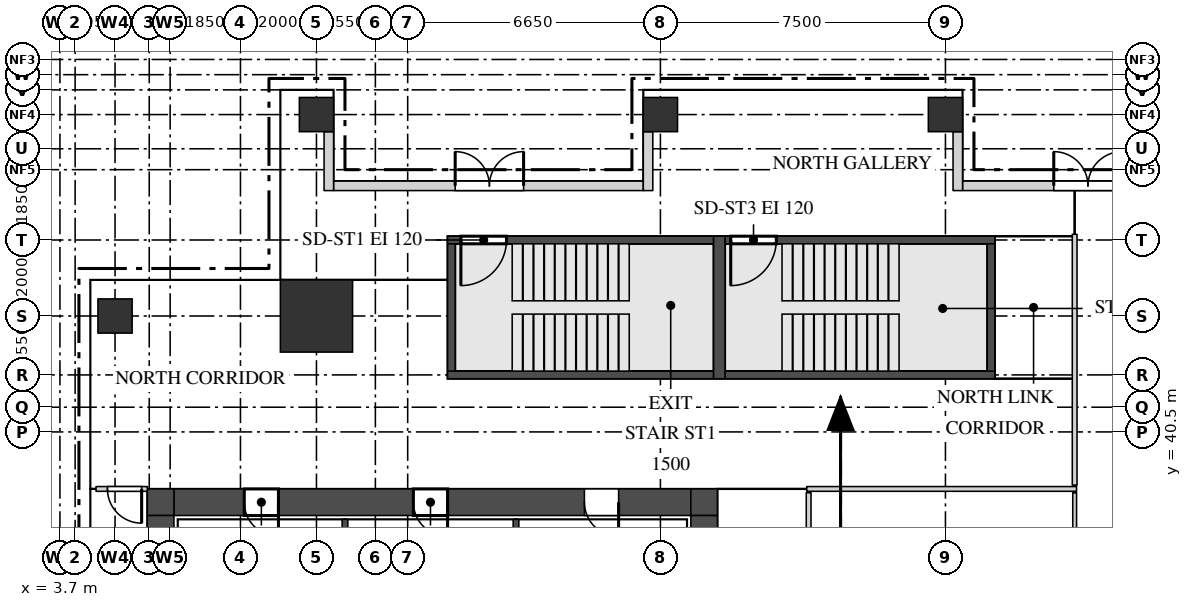
"""IFC4 building model, lengths in metres.
Left out: names, types, materials, properties, quantities, classifications, styles, units other than length and angle.
Written with IfcOpenShell. Run it as: python <this file> out.ifc"""

import sys

from ifc_helpers import new_model, si_unit, direction, frame, frame_2d, origin, origin_2d, place, context, subcontext, project, spatial, rectangle, extrude, source, transform, mapped, element, fill, save


model = new_model("IFC4")
c1 = context("Model", 3, precision=1e-05, world=origin(), true_north=direction((0.0, 1.0)))
c2 = subcontext(c1, "Body", "Model", "MODEL_VIEW")
j1 = project(units=[si_unit("LENGTHUNIT", "METRE"), si_unit("PLANEANGLEUNIT", "RADIAN")], contexts=[c1])
p1 = place(None, origin())
s1 = spatial("IfcSite", under=j1, at=p1, CompositionType="ELEMENT")
p2 = place(p1, origin())
s2 = spatial("IfcBuilding", under=s1, at=p2, CompositionType="ELEMENT")
p3 = place(p2, frame((0.0, 0.0, 234.2)))
s3 = spatial("IfcBuildingStorey", under=s2, at=p3, CompositionType="ELEMENT", Elevation=234.2)
m1 = source(origin(), c2, "Body", "SweptSolid", [
    extrude(rectangle(XDim=13.6, YDim=0.7, at=frame_2d((6.8, 0.0))), origin(), (0.0, 0.0, 1.0), 3.75),
])
p4 = place(p3, frame((6.7, 38.65, 0.0), z_axis=(0.0, 0.0, 1.0), x_axis=(1.0, 0.0, 0.0)))
e1 = element("IfcWall", 1, at=p4, inside=s3, PredefinedType="SHEAR", context=c2, shape_type="MappedRepresentation", body=[
    mapped(m1, transform((0.0, 0.0, 0.0))),
])
m2 = source(origin(), c2, "Body", "SweptSolid", [
    extrude(rectangle(XDim=0.9, YDim=2.1, at=frame_2d((0.45, 1.05))), frame((0.0, 0.36, 0.0), z_axis=(0.0, -1.0, 0.0), x_axis=(1.0, 0.0, 0.0)), (0.0, 0.0, 1.0), 0.72),
])
p5 = place(p4, frame((1.85, 0.0, 0.0)))
e2 = element("IfcOpeningElement", 2, at=p5, cuts=e1, PredefinedType="OPENING", context=c2, shape_type="MappedRepresentation", body=[
    mapped(m2, transform((0.0, 0.0, 0.0))),
])
p6 = place(p4, frame((6.3, 0.0, 0.0)))
e3 = element("IfcOpeningElement", 3, at=p6, cuts=e1, PredefinedType="OPENING", context=c2, shape_type="MappedRepresentation", body=[
    mapped(m2, transform((0.0, 0.0, 0.0))),
])
p7 = place(p4, frame((10.8, 0.0, 0.0)))
e4 = element("IfcOpeningElement", 4, at=p7, cuts=e1, PredefinedType="OPENING", context=c2, shape_type="MappedRepresentation", body=[
    mapped(m2, transform((0.0, 0.0, 0.0))),
])
m3 = source(origin(), c2, "Body", "SweptSolid", [
    extrude(rectangle(XDim=0.7, YDim=0.7, at=frame_2d((0.35, 0.0))), origin(), (0.0, 0.0, 1.0), 3.75),
])
for number, where, z_axis, x_axis in (
    (5, (20.3, 38.65, 0.0), (0.0, 0.0, 1.0), (1.0, 0.0, 0.0)),
    (6, (6.0, 38.65, 0.0), (0.0, 0.0, 1.0), (1.0, 0.0, 0.0)),
):
    element("IfcWall", number, at=place(p3, frame(where, z_axis=z_axis, x_axis=x_axis)), inside=s3, PredefinedType="SHEAR", context=c2, shape_type="MappedRepresentation", body=[
        mapped(m3, transform((0.0, 0.0, 0.0))),
    ])
m4 = source(origin(), c2, "Body", "SweptSolid", [
    extrude(rectangle(XDim=22.6, YDim=0.7, at=frame_2d((11.3, 0.0))), origin(), (0.0, 0.0, 1.0), 3.75),
])
p8 = place(p3, frame((20.65, 15.7, 0.0), z_axis=(0.0, 0.0, 1.0), x_axis=(0.0, 1.0, 0.0)))
e7 = element("IfcWall", 7, at=p8, inside=s3, PredefinedType="SHEAR", context=c2, shape_type="MappedRepresentation", body=[
    mapped(m4, transform((0.0, 0.0, 0.0))),
])
m5 = source(origin(), c2, "Body", "SweptSolid", [
    extrude(rectangle(XDim=1.8, YDim=2.1, at=frame_2d((0.9, 1.05))), frame((0.0, 0.36, 0.0), z_axis=(0.0, -1.0, 0.0), x_axis=(1.0, 0.0, 0.0)), (0.0, 0.0, 1.0), 0.72),
])
p9 = place(p8, frame((10.8, 0.0, 0.0)))
e8 = element("IfcOpeningElement", 8, at=p9, cuts=e7, PredefinedType="OPENING", context=c2, shape_type="MappedRepresentation", body=[
    mapped(m5, transform((0.0, 0.0, 0.0))),
])
p10 = place(p8, frame((0.45, 0.0, 0.0)))
e9 = element("IfcOpeningElement", 9, at=p10, cuts=e7, PredefinedType="OPENING", context=c2, shape_type="MappedRepresentation", body=[
    mapped(m2, transform((0.0, 0.0, 0.0))),
])
m6 = source(origin(), c2, "Body", "SweptSolid", [
    extrude(rectangle(XDim=1.0, YDim=2.1, at=frame_2d((0.5, 1.05))), frame((0.0, 0.36, 0.0), z_axis=(0.0, -1.0, 0.0), x_axis=(1.0, 0.0, 0.0)), (0.0, 0.0, 1.0), 0.72),
])
p11 = place(p8, frame((2.2, 0.0, 0.0)))
e10 = element("IfcOpeningElement", 10, at=p11, cuts=e7, PredefinedType="OPENING", context=c2, shape_type="MappedRepresentation", body=[
    mapped(m6, transform((0.0, 0.0, 0.0))),
])
p12 = place(p8, frame((5.0, 0.0, 0.0)))
e11 = element("IfcOpeningElement", 11, at=p12, cuts=e7, PredefinedType="OPENING", context=c2, shape_type="MappedRepresentation", body=[
    mapped(m2, transform((0.0, 0.0, 0.0))),
])
p13 = place(p3, frame((6.35, 15.7, 0.0), z_axis=(0.0, 0.0, 1.0), x_axis=(0.0, 1.0, 0.0)))
e12 = element("IfcWall", 12, at=p13, inside=s3, PredefinedType="SHEAR", context=c2, shape_type="MappedRepresentation", body=[
    mapped(m4, transform((0.0, 0.0, 0.0))),
])
m7 = source(origin(), c2, "Body", "SweptSolid", [
    extrude(rectangle(XDim=7.0, YDim=0.2, at=frame_2d((3.5, 0.0))), origin(), (0.0, 0.0, 1.0), 3.75),
])
p14 = place(p3, frame((13.9, 45.55, 0.0), z_axis=(0.0, 0.0, 1.0), x_axis=(1.0, 0.0, 0.0)))
e13 = element("IfcWall", 13, at=p14, inside=s3, PredefinedType="SHEAR", context=c2, shape_type="MappedRepresentation", body=[
    mapped(m7, transform((0.0, 0.0, 0.0))),
])
m8 = source(origin(), c2, "Body", "SweptSolid", [
    extrude(rectangle(XDim=1.2, YDim=2.1, at=frame_2d((0.6, 1.05))), frame((0.0, 0.11, 0.0), z_axis=(0.0, -1.0, 0.0), x_axis=(1.0, 0.0, 0.0)), (0.0, 0.0, 1.0), 0.22),
])
p15 = place(p14, frame((0.35, 0.0, 0.0)))
e14 = element("IfcOpeningElement", 14, at=p15, cuts=e13, PredefinedType="OPENING", context=c2, shape_type="MappedRepresentation", body=[
    mapped(m8, transform((0.0, 0.0, 0.0))),
])
p16 = place(p3, frame((13.9, 42.0, 0.0), z_axis=(0.0, 0.0, 1.0), x_axis=(1.0, 0.0, 0.0)))
e15 = element("IfcWall", 15, at=p16, inside=s3, PredefinedType="SHEAR", context=c2, shape_type="MappedRepresentation", body=[
    mapped(m7, transform((0.0, 0.0, 0.0))),
])
m9 = source(origin(), c2, "Body", "SweptSolid", [
    extrude(rectangle(XDim=7.1, YDim=0.2, at=frame_2d((3.55, 0.0))), origin(), (0.0, 0.0, 1.0), 3.75),
])
p17 = place(p3, frame((21.2, 45.55, 0.0), z_axis=(0.0, 0.0, 1.0), x_axis=(1.0, 0.0, 0.0)))
e16 = element("IfcWall", 16, at=p17, inside=s3, PredefinedType="SHEAR", context=c2, shape_type="MappedRepresentation", body=[
    mapped(m9, transform((0.0, 0.0, 0.0))),
])
p18 = place(p17, frame((0.15, 0.0, 0.0)))
e17 = element("IfcOpeningElement", 17, at=p18, cuts=e16, PredefinedType="OPENING", context=c2, shape_type="MappedRepresentation", body=[
    mapped(m8, transform((0.0, 0.0, 0.0))),
])
p19 = place(p3, frame((21.2, 42.0, 0.0), z_axis=(0.0, 0.0, 1.0), x_axis=(1.0, 0.0, 0.0)))
e18 = element("IfcWall", 18, at=p19, inside=s3, PredefinedType="SHEAR", context=c2, shape_type="MappedRepresentation", body=[
    mapped(m9, transform((0.0, 0.0, 0.0))),
])
m10 = source(origin(), c2, "Body", "SweptSolid", [
    extrude(rectangle(XDim=3.75, YDim=0.3, at=frame_2d((1.875, 0.0))), origin(), (0.0, 0.0, 1.0), 3.75),
])
p20 = place(p3, frame((21.05, 41.9, 0.0), z_axis=(0.0, 0.0, 1.0), x_axis=(0.0, 1.0, 0.0)))
e19 = element("IfcWall", 19, at=p20, inside=s3, PredefinedType="SHEAR", context=c2, shape_type="MappedRepresentation", body=[
    mapped(m10, transform((0.0, 0.0, 0.0))),
])
m11 = source(origin(), c2, "Body", "SweptSolid", [
    extrude(rectangle(XDim=3.35, YDim=0.2, at=frame_2d((1.675, 0.0))), origin(), (0.0, 0.0, 1.0), 3.75),
])
for number, where, z_axis, x_axis in (
    (20, (14.0, 42.1, 0.0), (0.0, 0.0, 1.0), (0.0, 1.0, 0.0)),
    (21, (28.2, 42.1, 0.0), (0.0, 0.0, 1.0), (0.0, 1.0, 0.0)),
):
    element("IfcWall", number, at=place(p3, frame(where, z_axis=z_axis, x_axis=x_axis)), inside=s3, PredefinedType="SHEAR", context=c2, shape_type="MappedRepresentation", body=[
        mapped(m11, transform((0.0, 0.0, 0.0))),
    ])
m12 = source(origin(), c2, "Body", "SweptSolid", [
    extrude(rectangle(XDim=1.9, YDim=1.9, at=origin_2d()), origin(), (0.0, 0.0, 1.0), 4.0),
])
p21 = place(p3, frame((10.45, 43.55, 0.0), z_axis=(0.0, 0.0, 1.0), x_axis=(1.0, 0.0, 0.0)))
e22 = element("IfcColumn", 22, at=p21, inside=s3, PredefinedType="COLUMN", context=c2, shape_type="MappedRepresentation", body=[
    mapped(m12, transform((0.0, 0.0, 0.0))),
])
m13 = source(origin(), c2, "Body", "SweptSolid", [
    extrude(rectangle(XDim=0.9, YDim=0.9, at=origin_2d()), origin(), (0.0, 0.0, 1.0), 3.75),
])
for number, where, z_axis, x_axis in (
    (23, (10.45, 48.85, 0.0), (0.0, 0.0, 1.0), (1.0, 0.0, 0.0)),
    (24, (19.5, 48.85, 0.0), (0.0, 0.0, 1.0), (1.0, 0.0, 0.0)),
    (25, (27.0, 48.85, 0.0), (0.0, 0.0, 1.0), (1.0, 0.0, 0.0)),
    (26, (5.15, 43.55, 0.0), (0.0, 0.0, 1.0), (1.0, 0.0, 0.0)),
):
    element("IfcColumn", number, at=place(p3, frame(where, z_axis=z_axis, x_axis=x_axis)), inside=s3, PredefinedType="COLUMN", context=c2, shape_type="MappedRepresentation", body=[
        mapped(m13, transform((0.0, 0.0, 0.0))),
    ])
m14 = source(origin(), c2, "Body", "SweptSolid", [
    extrude(rectangle(XDim=6.6, YDim=0.25, at=frame_2d((3.3, 0.0))), origin(), (0.0, 0.0, 1.0), 3.75),
])
p22 = place(p3, frame((27.45, 46.975, 0.0), z_axis=(0.0, 0.0, 1.0), x_axis=(1.0, 0.0, 0.0)))
e27 = element("IfcWall", 27, at=p22, inside=s3, PredefinedType="SOLIDWALL", context=c2, shape_type="MappedRepresentation", body=[
    mapped(m14, transform((0.0, 0.0, 0.0))),
])
m15 = source(origin(), c2, "Body", "SweptSolid", [
    extrude(rectangle(XDim=1.75, YDim=2.4, at=frame_2d((0.875, 1.2))), frame((0.0, 0.135, 0.0), z_axis=(0.0, -1.0, 0.0), x_axis=(1.0, 0.0, 0.0)), (0.0, 0.0, 1.0), 0.27),
])
p23 = place(p22, frame((0.35, 0.0, 0.0)))
e28 = element("IfcOpeningElement", 28, at=p23, cuts=e27, PredefinedType="OPENING", context=c2, shape_type="MappedRepresentation", body=[
    mapped(m15, transform((0.0, 0.0, 0.0))),
])
p24 = place(p22, frame((4.5, 0.0, 0.0)))
e29 = element("IfcOpeningElement", 29, at=p24, cuts=e27, PredefinedType="OPENING", context=c2, shape_type="MappedRepresentation", body=[
    mapped(m15, transform((0.0, 0.0, 0.0))),
])
m16 = source(origin(), c2, "Body", "SweptSolid", [
    extrude(rectangle(XDim=1.8, YDim=2.4, at=frame_2d((0.9, 1.2))), frame((0.0, 0.135, 0.0), z_axis=(0.0, -1.0, 0.0), x_axis=(1.0, 0.0, 0.0)), (0.0, 0.0, 1.0), 0.27),
])
p25 = place(p22, frame((2.4, 0.0, 0.0)))
e30 = element("IfcOpeningElement", 30, at=p25, cuts=e27, PredefinedType="OPENING", context=c2, shape_type="MappedRepresentation", body=[
    mapped(m16, transform((0.0, 0.0, 0.0))),
])
m17 = source(origin(), c2, "Body", "SweptSolid", [
    extrude(rectangle(XDim=1.55, YDim=0.25, at=frame_2d((0.775, 0.0))), origin(), (0.0, 0.0, 1.0), 3.45),
])
p26 = place(p3, frame((27.325, 48.4, 0.0), z_axis=(0.0, 0.0, 1.0), x_axis=(0.0, -1.0, 0.0)))
e31 = element("IfcWall", 31, at=p26, inside=s3, PredefinedType="SOLIDWALL", context=c2, shape_type="MappedRepresentation", body=[
    mapped(m17, transform((0.0, 0.0, 0.0))),
])
m18 = source(origin(), c2, "Body", "SweptSolid", [
    extrude(rectangle(XDim=8.15, YDim=0.25, at=frame_2d((4.075, 0.0))), origin(), (0.0, 0.0, 1.0), 3.35),
])
p27 = place(p3, frame((10.9, 46.975, 0.0), z_axis=(0.0, 0.0, 1.0), x_axis=(1.0, 0.0, 0.0)))
e32 = element("IfcWall", 32, at=p27, inside=s3, PredefinedType="SOLIDWALL", context=c2, shape_type="MappedRepresentation", body=[
    mapped(m18, transform((0.0, 0.0, 0.0))),
])
m19 = source(origin(), c2, "Body", "SweptSolid", [
    extrude(rectangle(XDim=2.55, YDim=2.4, at=frame_2d((1.275, 1.2))), frame((0.0, 0.135, 0.0), z_axis=(0.0, -1.0, 0.0), x_axis=(1.0, 0.0, 0.0)), (0.0, 0.0, 1.0), 0.27),
])
p28 = place(p27, frame((0.35, 0.0, 0.0)))
e33 = element("IfcOpeningElement", 33, at=p28, cuts=e32, PredefinedType="OPENING", context=c2, shape_type="MappedRepresentation", body=[
    mapped(m19, transform((0.0, 0.0, 0.0))),
])
p29 = place(p27, frame((5.3, 0.0, 0.0)))
e34 = element("IfcOpeningElement", 34, at=p29, cuts=e32, PredefinedType="OPENING", context=c2, shape_type="MappedRepresentation", body=[
    mapped(m19, transform((0.0, 0.0, 0.0))),
])
p30 = place(p27, frame((3.2, 0.0, 0.0)))
e35 = element("IfcOpeningElement", 35, at=p30, cuts=e32, PredefinedType="OPENING", context=c2, shape_type="MappedRepresentation", body=[
    mapped(m16, transform((0.0, 0.0, 0.0))),
])
m20 = source(origin(), c2, "Body", "SweptSolid", [
    extrude(rectangle(XDim=1.55, YDim=0.25, at=frame_2d((0.775, 0.0))), origin(), (0.0, 0.0, 1.0), 3.35),
])
for number, where, z_axis, x_axis in (
    (36, (10.775, 48.4, 0.0), (0.0, 0.0, 1.0), (0.0, -1.0, 0.0)),
    (37, (19.175, 48.4, 0.0), (0.0, 0.0, 1.0), (0.0, -1.0, 0.0)),
):
    element("IfcWall", number, at=place(p3, frame(where, z_axis=z_axis, x_axis=x_axis)), inside=s3, PredefinedType="SOLIDWALL", context=c2, shape_type="MappedRepresentation", body=[
        mapped(m20, transform((0.0, 0.0, 0.0))),
    ])
m21 = source(origin(), c2, "Body", "SweptSolid", [
    extrude(rectangle(XDim=11.4, YDim=0.125, at=frame_2d((5.7, 0.0))), origin(), (0.0, 0.0, 1.0), 3.8),
])
p31 = place(p3, frame((23.4, 27.5, 0.0), z_axis=(0.0, 0.0, 1.0), x_axis=(0.0, 1.0, 0.0)))
e38 = element("IfcWall", 38, at=p31, inside=s3, PredefinedType="PARTITIONING", context=c2, shape_type="MappedRepresentation", body=[
    mapped(m21, transform((0.0, 0.0, 0.0))),
])
m22 = source(origin(), c2, "Body", "SweptSolid", [
    extrude(rectangle(XDim=0.9, YDim=2.1, at=frame_2d((0.45, 1.05))), frame((0.0, 0.073, 0.0), z_axis=(0.0, -1.0, 0.0), x_axis=(1.0, 0.0, 0.0)), (0.0, 0.0, 1.0), 0.145),
])
p32 = place(p31, frame((5.4, 0.0, 0.0)))
e39 = element("IfcOpeningElement", 39, at=p32, cuts=e38, PredefinedType="OPENING", context=c2, shape_type="MappedRepresentation", body=[
    mapped(m22, transform((0.0, 0.0, 0.0))),
])
m23 = source(origin(), c2, "Body", "SweptSolid", [
    extrude(rectangle(XDim=11.4, YDim=0.1, at=frame_2d((5.7, 0.0))), origin(), (0.0, 0.0, 1.0), 3.8),
])
p33 = place(p3, frame((30.4, 27.5, 0.0), z_axis=(0.0, 0.0, 1.0), x_axis=(0.0, 1.0, 0.0)))
e40 = element("IfcWall", 40, at=p33, inside=s3, PredefinedType="PARTITIONING", context=c2, shape_type="MappedRepresentation", body=[
    mapped(m23, transform((0.0, 0.0, 0.0))),
])
m24 = source(origin(), c2, "Body", "SweptSolid", [
    extrude(rectangle(XDim=6.0, YDim=0.15, at=frame_2d((3.0, 0.0))), origin(), (0.0, 0.0, 1.0), 3.8),
])
for number, where, z_axis, x_axis in (
    (41, (11.2, 32.2, 0.0), (0.0, 0.0, 1.0), (0.0, 1.0, 0.0)),
    (42, (15.7, 32.2, 0.0), (0.0, 0.0, 1.0), (0.0, 1.0, 0.0)),
):
    element("IfcWall", number, at=place(p3, frame(where, z_axis=z_axis, x_axis=x_axis)), inside=s3, PredefinedType="PARTITIONING", context=c2, shape_type="MappedRepresentation", body=[
        mapped(m24, transform((0.0, 0.0, 0.0))),
    ])
m25 = source(origin(), c2, "Body", "SweptSolid", [
    extrude(rectangle(XDim=1.35, YDim=0.125, at=frame_2d((0.675, 0.0))), origin(), (0.0, 0.0, 1.0), 3.8),
])
p34 = place(p3, frame((4.65, 39.0, 0.0), z_axis=(0.0, 0.0, 1.0), x_axis=(1.0, 0.0, 0.0)))
e43 = element("IfcWall", 43, at=p34, inside=s3, PredefinedType="PARTITIONING", context=c2, shape_type="MappedRepresentation", body=[
    mapped(m25, transform((0.0, 0.0, 0.0))),
])
p35 = place(p34, frame((0.3, 0.0, 0.0)))
e44 = element("IfcOpeningElement", 44, at=p35, cuts=e43, PredefinedType="OPENING", context=c2, shape_type="MappedRepresentation", body=[
    mapped(m22, transform((0.0, 0.0, 0.0))),
])
m26 = source(origin(), c2, "Body", "SweptSolid", [
    extrude(rectangle(XDim=7.1, YDim=0.125, at=frame_2d((3.55, 0.0))), origin(), (0.0, 0.0, 1.0), 3.8),
])
p36 = place(p3, frame((23.35, 39.0, 0.0), z_axis=(0.0, 0.0, 1.0), x_axis=(1.0, 0.0, 0.0)))
e45 = element("IfcWall", 45, at=p36, inside=s3, PredefinedType="PARTITIONING", context=c2, shape_type="MappedRepresentation", body=[
    mapped(m26, transform((0.0, 0.0, 0.0))),
])
m27 = source(origin(), c2, "Body", "SweptSolid", [
    extrude(rectangle(XDim=6.6, YDim=0.125, at=frame_2d((3.3, 0.0))), origin(), (0.0, 0.0, 1.0), 3.8),
])
p37 = place(p3, frame((30.4, 39.1, 0.0), z_axis=(0.0, 0.0, 1.0), x_axis=(0.0, 1.0, 0.0)))
e46 = element("IfcWall", 46, at=p37, inside=s3, PredefinedType="PARTITIONING", context=c2, shape_type="MappedRepresentation", body=[
    mapped(m27, transform((0.0, 0.0, 0.0))),
])
m28 = source(origin(), c2, "Body", "SweptSolid", [
    extrude(rectangle(XDim=1.75, YDim=2.4, at=frame_2d((0.875, 1.2))), frame((0.0, 0.03, 0.0), z_axis=(0.0, -1.0, 0.0), x_axis=(1.0, 0.0, 0.0)), (0.0, 0.0, 1.0), 0.06),
])
p38 = place(p23, origin())
e47 = element("IfcWindow", 47, at=p38, inside=s3, PartitioningType="SINGLE_PANEL", PredefinedType="WINDOW", context=c2, shape_type="MappedRepresentation", body=[
    mapped(m28, transform((0.0, 0.0, 0.0))),
])
fill(e28, e47)
m29 = source(origin(), c2, "Body", "SweptSolid", [
    extrude(rectangle(XDim=1.8, YDim=2.4, at=frame_2d((0.9, 1.2))), frame((0.0, 0.025, 0.0), z_axis=(0.0, -1.0, 0.0), x_axis=(1.0, 0.0, 0.0)), (0.0, 0.0, 1.0), 0.05),
])
p39 = place(p25, origin())
e48 = element("IfcDoor", 48, at=p39, inside=s3, OperationType="DOUBLE_DOOR_DOUBLE_SWING", PredefinedType="DOOR", context=c2, shape_type="MappedRepresentation", body=[
    mapped(m29, transform((0.0, 0.0, 0.0))),
])
fill(e30, e48)
m30 = source(origin(), c2, "Body", "SweptSolid", [
    extrude(rectangle(XDim=2.55, YDim=2.4, at=frame_2d((1.275, 1.2))), frame((0.0, 0.03, 0.0), z_axis=(0.0, -1.0, 0.0), x_axis=(1.0, 0.0, 0.0)), (0.0, 0.0, 1.0), 0.06),
])
p40 = place(p28, origin())
e49 = element("IfcWindow", 49, at=p40, inside=s3, PartitioningType="SINGLE_PANEL", PredefinedType="WINDOW", context=c2, shape_type="MappedRepresentation", body=[
    mapped(m30, transform((0.0, 0.0, 0.0))),
])
fill(e33, e49)
p41 = place(p29, origin())
e50 = element("IfcWindow", 50, at=p41, inside=s3, PartitioningType="SINGLE_PANEL", PredefinedType="WINDOW", context=c2, shape_type="MappedRepresentation", body=[
    mapped(m30, transform((0.0, 0.0, 0.0))),
])
fill(e34, e50)
p42 = place(p30, origin())
e51 = element("IfcDoor", 51, at=p42, inside=s3, OperationType="DOUBLE_DOOR_DOUBLE_SWING", PredefinedType="DOOR", context=c2, shape_type="MappedRepresentation", body=[
    mapped(m29, transform((0.0, 0.0, 0.0))),
])
fill(e35, e51)
m31 = source(origin(), c2, "Body", "SweptSolid", [
    extrude(rectangle(XDim=0.9, YDim=2.1, at=frame_2d((0.45, 1.05))), frame((0.0, 0.3, 0.0), z_axis=(0.0, -1.0, 0.0), x_axis=(1.0, 0.0, 0.0)), (0.0, 0.0, 1.0), 0.6),
])
p43 = place(p5, origin())
e52 = element("IfcDoor", 52, at=p43, inside=s3, OperationType="SINGLE_SWING_RIGHT", PredefinedType="DOOR", context=c2, shape_type="MappedRepresentation", body=[
    mapped(m31, transform((0.0, 0.0, 0.0))),
])
fill(e2, e52)
p44 = place(p6, origin())
e53 = element("IfcDoor", 53, at=p44, inside=s3, OperationType="SINGLE_SWING_RIGHT", PredefinedType="DOOR", context=c2, shape_type="MappedRepresentation", body=[
    mapped(m31, transform((0.0, 0.0, 0.0))),
])
fill(e3, e53)
p45 = place(p7, origin())
e54 = element("IfcDoor", 54, at=p45, inside=s3, OperationType="SINGLE_SWING_RIGHT", PredefinedType="DOOR", context=c2, shape_type="MappedRepresentation", body=[
    mapped(m31, transform((0.0, 0.0, 0.0))),
])
fill(e4, e54)
m32 = source(origin(), c2, "Body", "SweptSolid", [
    extrude(rectangle(XDim=0.9, YDim=2.1, at=frame_2d((0.45, 1.05))), frame((0.0, 0.025, 0.0), z_axis=(0.0, -1.0, 0.0), x_axis=(1.0, 0.0, 0.0)), (0.0, 0.0, 1.0), 0.05),
])
p46 = place(p35, origin())
e55 = element("IfcDoor", 55, at=p46, inside=s3, OperationType="SINGLE_SWING_RIGHT", PredefinedType="DOOR", context=c2, shape_type="MappedRepresentation", body=[
    mapped(m32, transform((0.0, 0.0, 0.0))),
])
fill(e44, e55)
m33 = source(origin(), c2, "Body", "SweptSolid", [
    extrude(rectangle(XDim=1.2, YDim=2.1, at=frame_2d((0.6, 1.05))), frame((0.0, 0.025, 0.0), z_axis=(0.0, -1.0, 0.0), x_axis=(1.0, 0.0, 0.0)), (0.0, 0.0, 1.0), 0.05),
])
p47 = place(p15, origin())
e56 = element("IfcDoor", 56, at=p47, inside=s3, OperationType="SINGLE_SWING_LEFT", PredefinedType="DOOR", context=c2, shape_type="MappedRepresentation", body=[
    mapped(m33, transform((0.0, 0.0, 0.0))),
])
fill(e14, e56)
p48 = place(p18, origin())
e57 = element("IfcDoor", 57, at=p48, inside=s3, OperationType="SINGLE_SWING_LEFT", PredefinedType="DOOR", context=c2, shape_type="MappedRepresentation", body=[
    mapped(m33, transform((0.0, 0.0, 0.0))),
])
fill(e17, e57)
save(model, sys.argv[1])
